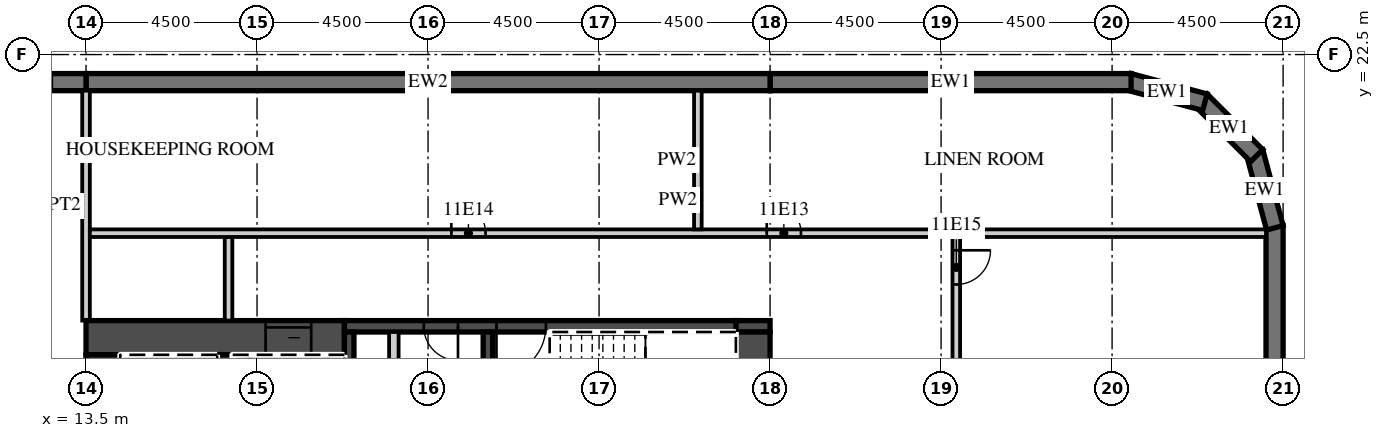
"""IFC4 building model, lengths in metres.
Left out: names, types, materials, properties, quantities, classifications, styles, units other than length and angle.
Written with IfcOpenShell. Run it as: python <this file> out.ifc"""

import sys

from ifc_helpers import new_model, si_unit, direction, frame, frame_2d, origin, place, context, subcontext, project, spatial, polyline, rectangle, outline, extrude, element, fill, save


model = new_model("IFC4")
c1 = context("Model", 3, precision=1e-05, world=origin(), true_north=direction((0.0, 1.0)))
c2 = subcontext(c1, "Body", "Model", "MODEL_VIEW")
j1 = project(units=[si_unit("LENGTHUNIT", "METRE"), si_unit("PLANEANGLEUNIT", "RADIAN")], contexts=[c1])
p1 = place(None, origin())
s1 = spatial("IfcSite", under=j1, at=p1, CompositionType="ELEMENT")
p2 = place(p1, origin())
s2 = spatial("IfcBuilding", under=s1, at=p2, CompositionType="ELEMENT")
p3 = place(p2, frame((0.0, 0.0, 66.6)))
s3 = spatial("IfcBuildingStorey", under=s2, at=p3, CompositionType="ELEMENT", Elevation=66.6)
p4 = place(p3, frame((44.775, -18.0, 0.0), z_axis=(0.0, 0.0, 1.0), x_axis=(0.0, 1.0, 0.0)))
e1 = element("IfcWall", 1, at=p4, inside=s3, PredefinedType="SOLIDWALL", context=c2, shape_type="SweptSolid", body=[
    extrude(rectangle(XDim=36.0, YDim=0.45, at=frame_2d((18.0, 0.0))), origin(), (0.0, 0.0, 1.0), 3.02),
])
p5 = place(p4, frame((3.9, 0.0, 0.45)))
e2 = element("IfcOpeningElement", 2, at=p5, cuts=e1, PredefinedType="OPENING", context=c2, shape_type="SweptSolid", body=[
    extrude(rectangle(XDim=3.3, YDim=2.25, at=frame_2d((1.65, 1.125))), frame((0.0, 0.235, 0.0), z_axis=(0.0, -1.0, 0.0), x_axis=(1.0, 0.0, 0.0)), (0.0, 0.0, 1.0), 0.47),
])
p6 = place(p4, frame((8.4, 0.0, 0.45)))
e3 = element("IfcOpeningElement", 3, at=p6, cuts=e1, PredefinedType="OPENING", context=c2, shape_type="SweptSolid", body=[
    extrude(rectangle(XDim=3.3, YDim=2.25, at=frame_2d((1.65, 1.125))), frame((0.0, 0.235, 0.0), z_axis=(0.0, -1.0, 0.0), x_axis=(1.0, 0.0, 0.0)), (0.0, 0.0, 1.0), 0.47),
])
p7 = place(p4, frame((12.9, 0.0, 0.45)))
e4 = element("IfcOpeningElement", 4, at=p7, cuts=e1, PredefinedType="OPENING", context=c2, shape_type="SweptSolid", body=[
    extrude(rectangle(XDim=3.3, YDim=2.25, at=frame_2d((1.65, 1.125))), frame((0.0, 0.235, 0.0), z_axis=(0.0, -1.0, 0.0), x_axis=(1.0, 0.0, 0.0)), (0.0, 0.0, 1.0), 0.47),
])
p8 = place(p3, frame((44.783, 17.942, 0.0), z_axis=(0.0, 0.0, 1.0), x_axis=(-0.25881466832, 0.965926999034, 0.0)))
e5 = element("IfcWall", 5, at=p8, inside=s3, PredefinedType="SOLIDWALL", context=c2, shape_type="SweptSolid", body=[
    extrude(outline(polyline([(0.0, -0.225), (2.071, -0.225), (1.95, 0.225), (0.121, 0.225), (0.0, -0.225)])), origin(), (0.0, 0.0, 1.0), 3.02),
])
p9 = place(p3, frame((44.305, 19.841, 0.0), z_axis=(0.0, 0.0, 1.0), x_axis=(-0.707106781187, 0.707106781187, 0.0)))
e6 = element("IfcWall", 6, at=p9, inside=s3, PredefinedType="SOLIDWALL", context=c2, shape_type="SweptSolid", body=[
    extrude(outline(polyline([(0.0, -0.225), (2.071, -0.225), (1.95, 0.225), (0.121, 0.225), (0.0, -0.225)])), origin(), (0.0, 0.0, 1.0), 3.02),
])
p10 = place(p3, frame((42.942, 21.247, 0.0), z_axis=(0.0, 0.0, 1.0), x_axis=(-0.965926999034, 0.25881466832, 0.0)))
e7 = element("IfcWall", 7, at=p10, inside=s3, PredefinedType="SOLIDWALL", context=c2, shape_type="SweptSolid", body=[
    extrude(outline(polyline([(-0.0, -0.225), (2.07, -0.225), (1.95, 0.225), (0.12, 0.225), (-0.0, -0.225)])), origin(), (0.0, 0.0, 1.0), 3.02),
])
p11 = place(p3, frame((41.0, 21.775, 0.0), z_axis=(0.0, 0.0, 1.0), x_axis=(-1.0, 0.0, 0.0)))
e8 = element("IfcWall", 8, at=p11, inside=s3, PredefinedType="SOLIDWALL", context=c2, shape_type="SweptSolid", body=[
    extrude(rectangle(XDim=9.5, YDim=0.45, at=frame_2d((4.75, 0.0))), origin(), (0.0, 0.0, 1.0), 3.02),
])
p12 = place(p3, frame((31.5, 21.775, 0.0), z_axis=(0.0, 0.0, 1.0), x_axis=(-1.0, 0.0, 0.0)))
e9 = element("IfcWall", 9, at=p12, inside=s3, PredefinedType="SOLIDWALL", context=c2, shape_type="SweptSolid", body=[
    extrude(rectangle(XDim=18.0, YDim=0.45, at=frame_2d((9.0, 0.0))), origin(), (0.0, 0.0, 1.0), 3.02),
])
p13 = place(p3, frame((13.5, 21.775, 0.0), z_axis=(0.0, 0.0, 1.0), x_axis=(-1.0, 0.0, 0.0)))
e10 = element("IfcWall", 10, at=p13, inside=s3, PredefinedType="SOLIDWALL", context=c2, shape_type="SweptSolid", body=[
    extrude(rectangle(XDim=54.5, YDim=0.45, at=frame_2d((27.25, 0.0))), origin(), (0.0, 0.0, 1.0), 3.02),
])
p14 = place(p13, frame((0.9, 0.0, 0.45)))
e11 = element("IfcOpeningElement", 11, at=p14, cuts=e10, PredefinedType="OPENING", context=c2, shape_type="SweptSolid", body=[
    extrude(rectangle(XDim=2.7, YDim=2.25, at=frame_2d((1.35, 1.125))), frame((0.0, 0.235, 0.0), z_axis=(0.0, -1.0, 0.0), x_axis=(1.0, 0.0, 0.0)), (0.0, 0.0, 1.0), 0.47),
])
p15 = place(p13, frame((5.4, 0.0, 0.45)))
e12 = element("IfcOpeningElement", 12, at=p15, cuts=e10, PredefinedType="OPENING", context=c2, shape_type="SweptSolid", body=[
    extrude(rectangle(XDim=2.7, YDim=2.25, at=frame_2d((1.35, 1.125))), frame((0.0, 0.235, 0.0), z_axis=(0.0, -1.0, 0.0), x_axis=(1.0, 0.0, 0.0)), (0.0, 0.0, 1.0), 0.47),
])
p16 = place(p13, frame((9.9, 0.0, 0.45)))
e13 = element("IfcOpeningElement", 13, at=p16, cuts=e10, PredefinedType="OPENING", context=c2, shape_type="SweptSolid", body=[
    extrude(rectangle(XDim=2.7, YDim=2.25, at=frame_2d((1.35, 1.125))), frame((0.0, 0.235, 0.0), z_axis=(0.0, -1.0, 0.0), x_axis=(1.0, 0.0, 0.0)), (0.0, 0.0, 1.0), 0.47),
])
p17 = place(p13, frame((14.4, 0.0, 0.45)))
e14 = element("IfcOpeningElement", 14, at=p17, cuts=e10, PredefinedType="OPENING", context=c2, shape_type="SweptSolid", body=[
    extrude(rectangle(XDim=2.7, YDim=2.25, at=frame_2d((1.35, 1.125))), frame((0.0, 0.235, 0.0), z_axis=(0.0, -1.0, 0.0), x_axis=(1.0, 0.0, 0.0)), (0.0, 0.0, 1.0), 0.47),
])
p18 = place(p13, frame((18.9, 0.0, 0.45)))
e15 = element("IfcOpeningElement", 15, at=p18, cuts=e10, PredefinedType="OPENING", context=c2, shape_type="SweptSolid", body=[
    extrude(rectangle(XDim=2.7, YDim=2.25, at=frame_2d((1.35, 1.125))), frame((0.0, 0.235, 0.0), z_axis=(0.0, -1.0, 0.0), x_axis=(1.0, 0.0, 0.0)), (0.0, 0.0, 1.0), 0.47),
])
p19 = place(p13, frame((23.4, 0.0, 0.45)))
e16 = element("IfcOpeningElement", 16, at=p19, cuts=e10, PredefinedType="OPENING", context=c2, shape_type="SweptSolid", body=[
    extrude(rectangle(XDim=2.7, YDim=2.25, at=frame_2d((1.35, 1.125))), frame((0.0, 0.235, 0.0), z_axis=(0.0, -1.0, 0.0), x_axis=(1.0, 0.0, 0.0)), (0.0, 0.0, 1.0), 0.47),
])
p20 = place(p13, frame((27.9, 0.0, 0.45)))
e17 = element("IfcOpeningElement", 17, at=p20, cuts=e10, PredefinedType="OPENING", context=c2, shape_type="SweptSolid", body=[
    extrude(rectangle(XDim=2.7, YDim=2.25, at=frame_2d((1.35, 1.125))), frame((0.0, 0.235, 0.0), z_axis=(0.0, -1.0, 0.0), x_axis=(1.0, 0.0, 0.0)), (0.0, 0.0, 1.0), 0.47),
])
p21 = place(p13, frame((32.4, 0.0, 0.45)))
e18 = element("IfcOpeningElement", 18, at=p21, cuts=e10, PredefinedType="OPENING", context=c2, shape_type="SweptSolid", body=[
    extrude(rectangle(XDim=2.7, YDim=2.25, at=frame_2d((1.35, 1.125))), frame((0.0, 0.235, 0.0), z_axis=(0.0, -1.0, 0.0), x_axis=(1.0, 0.0, 0.0)), (0.0, 0.0, 1.0), 0.47),
])
p22 = place(p13, frame((36.9, 0.0, 0.45)))
e19 = element("IfcOpeningElement", 19, at=p22, cuts=e10, PredefinedType="OPENING", context=c2, shape_type="SweptSolid", body=[
    extrude(rectangle(XDim=2.7, YDim=2.25, at=frame_2d((1.35, 1.125))), frame((0.0, 0.235, 0.0), z_axis=(0.0, -1.0, 0.0), x_axis=(1.0, 0.0, 0.0)), (0.0, 0.0, 1.0), 0.47),
])
p23 = place(p13, frame((41.4, 0.0, 0.45)))
e20 = element("IfcOpeningElement", 20, at=p23, cuts=e10, PredefinedType="OPENING", context=c2, shape_type="SweptSolid", body=[
    extrude(rectangle(XDim=2.7, YDim=2.25, at=frame_2d((1.35, 1.125))), frame((0.0, 0.235, 0.0), z_axis=(0.0, -1.0, 0.0), x_axis=(1.0, 0.0, 0.0)), (0.0, 0.0, 1.0), 0.47),
])
p24 = place(p13, frame((45.9, 0.0, 0.45)))
e21 = element("IfcOpeningElement", 21, at=p24, cuts=e10, PredefinedType="OPENING", context=c2, shape_type="SweptSolid", body=[
    extrude(rectangle(XDim=2.7, YDim=2.25, at=frame_2d((1.35, 1.125))), frame((0.0, 0.235, 0.0), z_axis=(0.0, -1.0, 0.0), x_axis=(1.0, 0.0, 0.0)), (0.0, 0.0, 1.0), 0.47),
])
p25 = place(p13, frame((50.4, 0.0, 0.45)))
e22 = element("IfcOpeningElement", 22, at=p25, cuts=e10, PredefinedType="OPENING", context=c2, shape_type="SweptSolid", body=[
    extrude(rectangle(XDim=2.7, YDim=2.25, at=frame_2d((1.35, 1.125))), frame((0.0, 0.235, 0.0), z_axis=(0.0, -1.0, 0.0), x_axis=(1.0, 0.0, 0.0)), (0.0, 0.0, 1.0), 0.47),
])
p26 = place(p3, frame((13.5, 15.5, 0.0), z_axis=(0.0, 0.0, 1.0), x_axis=(0.0, 1.0, 0.0)))
e23 = element("IfcWall", 23, at=p26, inside=s3, PredefinedType="PARTITIONING", context=c2, shape_type="SweptSolid", body=[
    extrude(rectangle(XDim=6.05, YDim=0.2, at=frame_2d((3.025, 0.0))), origin(), (0.0, 0.0, 1.0), 3.02),
])
p27 = place(p3, frame((13.5, 15.05, 0.0), z_axis=(0.0, 0.0, 1.0), x_axis=(1.0, 0.0, 0.0)))
e24 = element("IfcWall", 24, at=p27, inside=s3, PredefinedType="SHEAR", context=c2, shape_type="SweptSolid", body=[
    extrude(rectangle(XDim=6.8, YDim=0.9, at=frame_2d((3.4, 0.0))), origin(), (0.0, 0.0, 1.0), 3.02),
])
p28 = place(p27, frame((4.725, 0.0, 0.0)))
e25 = element("IfcOpeningElement", 25, at=p28, cuts=e24, PredefinedType="OPENING", context=c2, shape_type="SweptSolid", body=[
    extrude(rectangle(XDim=1.2, YDim=2.1, at=frame_2d((0.6, 1.05))), frame((0.0, 0.46, 0.0), z_axis=(0.0, -1.0, 0.0), x_axis=(1.0, 0.0, 0.0)), (0.0, 0.0, 1.0), 0.92),
])
p29 = place(p3, frame((30.6, 15.35, 0.0), z_axis=(0.0, 0.0, 1.0), x_axis=(1.0, 0.0, 0.0)))
e26 = element("IfcWall", 26, at=p29, inside=s3, PredefinedType="SHEAR", context=c2, shape_type="SweptSolid", body=[
    extrude(rectangle(XDim=0.9, YDim=0.3, at=frame_2d((0.45, 0.0))), origin(), (0.0, 0.0, 1.0), 3.02),
])
p30 = place(p3, frame((20.3, 15.35, 0.0), z_axis=(0.0, 0.0, 1.0), x_axis=(1.0, 0.0, 0.0)))
e27 = element("IfcWall", 27, at=p30, inside=s3, PredefinedType="SHEAR", context=c2, shape_type="SweptSolid", body=[
    extrude(rectangle(XDim=10.3, YDim=0.3, at=frame_2d((5.15, 0.0))), origin(), (0.0, 0.0, 1.0), 3.02),
])
p31 = place(p30, frame((4.0, 0.0, 0.0)))
e28 = element("IfcOpeningElement", 28, at=p31, cuts=e27, PredefinedType="OPENING", context=c2, shape_type="SweptSolid", body=[
    extrude(rectangle(XDim=1.3, YDim=2.1, at=frame_2d((0.65, 1.05))), frame((0.0, 0.16, 0.0), z_axis=(0.0, -1.0, 0.0), x_axis=(1.0, 0.0, 0.0)), (0.0, 0.0, 1.0), 0.32),
])
p32 = place(p30, frame((2.087, 0.0, 0.0)))
e29 = element("IfcOpeningElement", 29, at=p32, cuts=e27, PredefinedType="OPENING", context=c2, shape_type="SweptSolid", body=[
    extrude(rectangle(XDim=0.9, YDim=2.1, at=frame_2d((0.45, 1.05))), frame((0.0, 0.16, 0.0), z_axis=(0.0, -1.0, 0.0), x_axis=(1.0, 0.0, 0.0)), (0.0, 0.0, 1.0), 0.32),
])
p33 = place(p3, frame((31.05, 2.4, 0.0), z_axis=(0.0, 0.0, 1.0), x_axis=(0.0, 1.0, 0.0)))
e30 = element("IfcWall", 30, at=p33, inside=s3, PredefinedType="SHEAR", context=c2, shape_type="SweptSolid", body=[
    extrude(rectangle(XDim=12.8, YDim=0.9, at=frame_2d((6.4, 0.0))), origin(), (0.0, 0.0, 1.0), 3.02),
])
p34 = place(p33, frame((0.2, 0.0, 0.0)))
e31 = element("IfcOpeningElement", 31, at=p34, cuts=e30, PredefinedType="OPENING", context=c2, shape_type="SweptSolid", body=[
    extrude(rectangle(XDim=1.1, YDim=2.1, at=frame_2d((0.55, 1.05))), frame((0.0, 0.46, 0.0), z_axis=(0.0, -1.0, 0.0), x_axis=(1.0, 0.0, 0.0)), (0.0, 0.0, 1.0), 0.92),
])
p35 = place(p3, frame((13.95, 2.4, 0.0), z_axis=(0.0, 0.0, 1.0), x_axis=(0.0, 1.0, 0.0)))
e32 = element("IfcWall", 32, at=p35, inside=s3, PredefinedType="SHEAR", context=c2, shape_type="SweptSolid", body=[
    extrude(rectangle(XDim=12.2, YDim=0.9, at=frame_2d((6.1, 0.0))), origin(), (0.0, 0.0, 1.0), 3.02),
])
p36 = place(p3, frame((17.15, 8.8, 0.0), z_axis=(0.0, 0.0, 1.0), x_axis=(0.0, 1.0, 0.0)))
e33 = element("IfcWall", 33, at=p36, inside=s3, PredefinedType="SHEAR", context=c2, shape_type="SweptSolid", body=[
    extrude(rectangle(XDim=5.8, YDim=0.4, at=frame_2d((2.9, 0.0))), origin(), (0.0, 0.0, 1.0), 3.02),
])
for number, where, z_axis, x_axis in (
    (34, (20.425, 11.95, 0.0), (0.0, 0.0, 1.0), (0.0, 1.0, 0.0)),
    (35, (24.075, 11.95, 0.0), (0.0, 0.0, 1.0), (0.0, 1.0, 0.0)),
):
    element("IfcWall", number, at=place(p3, frame(where, z_axis=z_axis, x_axis=x_axis)), inside=s3, PredefinedType="SHEAR", context=c2, shape_type="SweptSolid", body=[
        extrude(rectangle(XDim=3.25, YDim=0.25, at=frame_2d((1.625, 0.0))), origin(), (0.0, 0.0, 1.0), 3.02),
    ])
p37 = place(p3, frame((21.6, 11.95, 0.0), z_axis=(0.0, 0.0, 1.0), x_axis=(0.0, 1.0, 0.0)))
e36 = element("IfcWall", 36, at=p37, inside=s3, PredefinedType="PARTITIONING", context=c2, shape_type="SweptSolid", body=[
    extrude(rectangle(XDim=3.25, YDim=0.25, at=frame_2d((1.625, 0.0))), origin(), (0.0, 0.0, 1.0), 3.02),
])
p38 = place(p3, frame((17.25, 15.5, 0.0), z_axis=(0.0, 0.0, 1.0), x_axis=(0.0, 1.0, 0.0)))
e37 = element("IfcWall", 37, at=p38, inside=s3, PredefinedType="PARTITIONING", context=c2, shape_type="SweptSolid", body=[
    extrude(rectangle(XDim=2.2, YDim=0.2, at=frame_2d((1.1, 0.0))), origin(), (0.0, 0.0, 1.0), 3.02),
])
p39 = place(p3, frame((36.4, 1.75, 0.0), z_axis=(0.0, 0.0, 1.0), x_axis=(0.0, 1.0, 0.0)))
e38 = element("IfcWall", 38, at=p39, inside=s3, PredefinedType="PARTITIONING", context=c2, shape_type="SweptSolid", body=[
    extrude(rectangle(XDim=15.95, YDim=0.2, at=frame_2d((7.975, 0.0))), origin(), (0.0, 0.0, 1.0), 3.02),
])
p40 = place(p39, frame((14.7, 0.0, 0.0)))
e39 = element("IfcOpeningElement", 39, at=p40, cuts=e38, PredefinedType="OPENING", context=c2, shape_type="SweptSolid", body=[
    extrude(rectangle(XDim=0.9, YDim=2.1, at=frame_2d((0.45, 1.05))), frame((0.0, 0.11, 0.0), z_axis=(0.0, -1.0, 0.0), x_axis=(1.0, 0.0, 0.0)), (0.0, 0.0, 1.0), 0.22),
])
p41 = place(p3, frame((13.6, 17.8, 0.0), z_axis=(0.0, 0.0, 1.0), x_axis=(1.0, 0.0, 0.0)))
e40 = element("IfcWall", 40, at=p41, inside=s3, PredefinedType="PARTITIONING", context=c2, shape_type="SweptSolid", body=[
    extrude(rectangle(XDim=30.95, YDim=0.2, at=frame_2d((15.475, 0.0))), origin(), (0.0, 0.0, 1.0), 3.02),
])
p42 = place(p41, frame((17.812, 0.0, 0.0)))
e41 = element("IfcOpeningElement", 41, at=p42, cuts=e40, PredefinedType="OPENING", context=c2, shape_type="SweptSolid", body=[
    extrude(rectangle(XDim=0.9, YDim=2.1, at=frame_2d((0.45, 1.05))), frame((0.0, 0.11, 0.0), z_axis=(0.0, -1.0, 0.0), x_axis=(1.0, 0.0, 0.0)), (0.0, 0.0, 1.0), 0.22),
])
p43 = place(p41, frame((9.512, 0.0, 0.0)))
e42 = element("IfcOpeningElement", 42, at=p43, cuts=e40, PredefinedType="OPENING", context=c2, shape_type="SweptSolid", body=[
    extrude(rectangle(XDim=0.9, YDim=2.1, at=frame_2d((0.45, 1.05))), frame((0.0, 0.11, 0.0), z_axis=(0.0, -1.0, 0.0), x_axis=(1.0, 0.0, 0.0)), (0.0, 0.0, 1.0), 0.22),
])
p44 = place(p3, frame((29.6, 17.9, 0.0), z_axis=(0.0, 0.0, 1.0), x_axis=(0.0, 1.0, 0.0)))
e43 = element("IfcWall", 43, at=p44, inside=s3, PredefinedType="PARTITIONING", context=c2, shape_type="SweptSolid", body=[
    extrude(rectangle(XDim=3.65, YDim=0.2, at=frame_2d((1.825, 0.0))), origin(), (0.0, 0.0, 1.0), 3.02),
])
p45 = place(p28, origin())
e44 = element("IfcDoor", 44, at=p45, inside=s3, OperationType="SLIDING_TO_LEFT", PredefinedType="DOOR", context=c2, shape_type="SweptSolid", body=[
    extrude(rectangle(XDim=1.2, YDim=2.1, at=frame_2d((0.6, 1.05))), frame((0.0, 0.025, 0.0), z_axis=(0.0, -1.0, 0.0), x_axis=(1.0, 0.0, 0.0)), (0.0, 0.0, 1.0), 0.05),
])
fill(e25, e44)
p46 = place(p31, origin())
e45 = element("IfcDoor", 45, at=p46, inside=s3, OperationType="SINGLE_SWING_LEFT", PredefinedType="DOOR", context=c2, shape_type="SweptSolid", body=[
    extrude(rectangle(XDim=1.3, YDim=2.1, at=frame_2d((0.65, 1.05))), frame((0.0, 0.025, 0.0), z_axis=(0.0, -1.0, 0.0), x_axis=(1.0, 0.0, 0.0)), (0.0, 0.0, 1.0), 0.05),
])
fill(e28, e45)
p47 = place(p32, origin())
e46 = element("IfcDoor", 46, at=p47, inside=s3, OperationType="SINGLE_SWING_RIGHT", PredefinedType="DOOR", context=c2, shape_type="SweptSolid", body=[
    extrude(rectangle(XDim=0.9, YDim=2.1, at=frame_2d((0.45, 1.05))), frame((0.0, 0.025, 0.0), z_axis=(0.0, -1.0, 0.0), x_axis=(1.0, 0.0, 0.0)), (0.0, 0.0, 1.0), 0.05),
])
fill(e29, e46)
p48 = place(p42, origin())
e47 = element("IfcDoor", 47, at=p48, inside=s3, OperationType="SINGLE_SWING_LEFT", PredefinedType="DOOR", context=c2, shape_type="SweptSolid", body=[
    extrude(rectangle(XDim=0.9, YDim=2.1, at=frame_2d((0.45, 1.05))), frame((0.0, 0.025, 0.0), z_axis=(0.0, -1.0, 0.0), x_axis=(1.0, 0.0, 0.0)), (0.0, 0.0, 1.0), 0.05),
])
fill(e41, e47)
p49 = place(p43, origin())
e48 = element("IfcDoor", 48, at=p49, inside=s3, OperationType="SINGLE_SWING_LEFT", PredefinedType="DOOR", context=c2, shape_type="SweptSolid", body=[
    extrude(rectangle(XDim=0.9, YDim=2.1, at=frame_2d((0.45, 1.05))), frame((0.0, 0.025, 0.0), z_axis=(0.0, -1.0, 0.0), x_axis=(1.0, 0.0, 0.0)), (0.0, 0.0, 1.0), 0.05),
])
fill(e42, e48)
p50 = place(p40, origin())
e49 = element("IfcDoor", 49, at=p50, inside=s3, OperationType="SINGLE_SWING_RIGHT", PredefinedType="DOOR", context=c2, shape_type="SweptSolid", body=[
    extrude(rectangle(XDim=0.9, YDim=2.1, at=frame_2d((0.45, 1.05))), frame((0.0, 0.025, 0.0), z_axis=(0.0, -1.0, 0.0), x_axis=(1.0, 0.0, 0.0)), (0.0, 0.0, 1.0), 0.05),
])
fill(e39, e49)
save(model, sys.argv[1])
